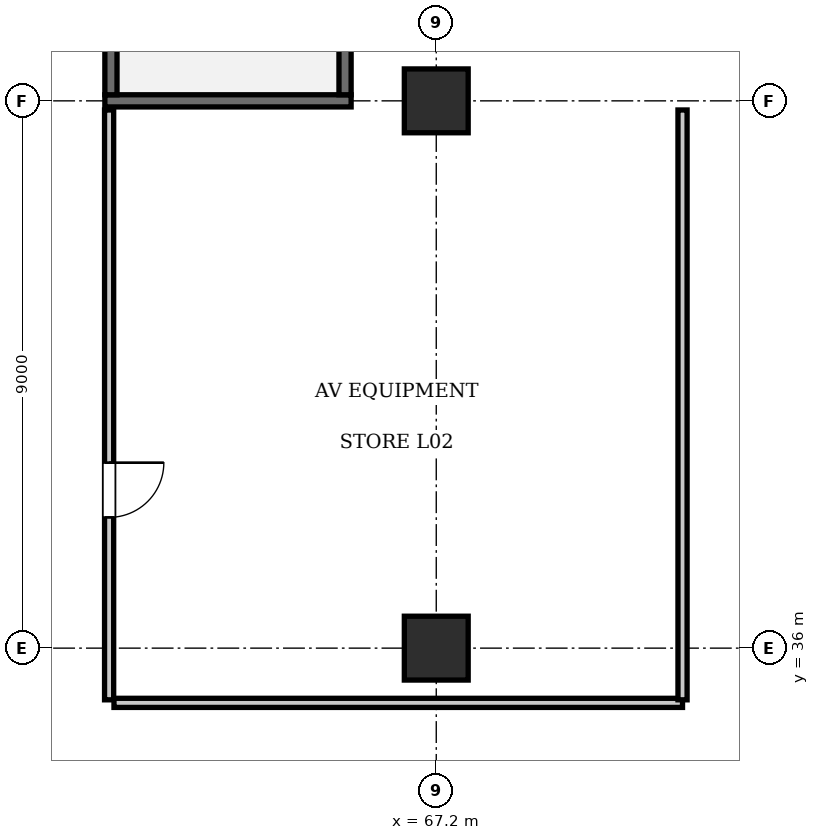
"""IFC4 building model, lengths in metres.
Left out: names, types, materials, properties, quantities, classifications, styles, units other than length and angle.
Written with IfcOpenShell. Run it as: python <this file> out.ifc"""

import sys

from ifc_helpers import new_model, si_unit, direction, frame, frame_2d, origin, origin_2d, place, context, subcontext, project, spatial, rectangle, extrude, element, fill, save


model = new_model("IFC4")
c1 = context("Model", 3, precision=1e-05, world=origin(), true_north=direction((0.0, 1.0)))
c2 = subcontext(c1, "Body", "Model", "MODEL_VIEW")
j1 = project(units=[si_unit("LENGTHUNIT", "METRE"), si_unit("PLANEANGLEUNIT", "RADIAN")], contexts=[c1])
p1 = place(None, origin())
s1 = spatial("IfcSite", under=j1, at=p1, CompositionType="ELEMENT")
p2 = place(p1, origin())
s2 = spatial("IfcBuilding", under=s1, at=p2, CompositionType="ELEMENT")
p3 = place(p2, frame((0.0, 0.0, 10.85)))
s3 = spatial("IfcBuildingStorey", under=s2, at=p3, CompositionType="ELEMENT", Elevation=10.85)
for number, where, z_axis, x_axis in (
    (1, (67.2, 36.0, 0.0), (0.0, 0.0, 1.0), (1.0, 0.0, 0.0)),
    (2, (67.2, 45.0, 0.0), (0.0, 0.0, 1.0), (1.0, 0.0, 0.0)),
):
    element("IfcColumn", number, at=place(p3, frame(where, z_axis=z_axis, x_axis=x_axis)), inside=s3, PredefinedType="COLUMN", context=c2, shape_type="SweptSolid", body=[
        extrude(rectangle(XDim=1.05, YDim=1.05, at=origin_2d()), origin(), (0.0, 0.0, 1.0), 5.6),
    ])
p4 = place(p3, frame((61.75, 45.0, 0.0), z_axis=(0.0, 0.0, 1.0), x_axis=(1.0, 0.0, 0.0)))
e3 = element("IfcWall", 3, at=p4, inside=s3, PredefinedType="SOLIDWALL", context=c2, shape_type="SweptSolid", body=[
    extrude(rectangle(XDim=4.05, YDim=0.2, at=frame_2d((2.025, 0.0))), origin(), (0.0, 0.0, 1.0), 4.685),
])
p5 = place(p3, frame((61.85, 45.1, 0.0), z_axis=(0.0, 0.0, 1.0), x_axis=(0.0, 1.0, 0.0)))
e4 = element("IfcWall", 4, at=p5, inside=s3, PredefinedType="SOLIDWALL", context=c2, shape_type="SweptSolid", body=[
    extrude(rectangle(XDim=8.1, YDim=0.2, at=frame_2d((4.05, 0.0))), origin(), (0.0, 0.0, 1.0), 5.32),
])
p6 = place(p5, frame((6.32, 0.0, 0.0)))
e5 = element("IfcOpeningElement", 5, at=p6, cuts=e4, PredefinedType="OPENING", context=c2, shape_type="SweptSolid", body=[
    extrude(rectangle(XDim=1.15, YDim=2.15, at=frame_2d((0.575, 1.075))), frame((0.0, 0.11, 0.0), z_axis=(0.0, -1.0, 0.0), x_axis=(1.0, 0.0, 0.0)), (0.0, 0.0, 1.0), 0.22),
])
p7 = place(p3, frame((65.7, 45.1, 0.0), z_axis=(0.0, 0.0, 1.0), x_axis=(0.0, 1.0, 0.0)))
e6 = element("IfcWall", 6, at=p7, inside=s3, PredefinedType="SOLIDWALL", context=c2, shape_type="SweptSolid", body=[
    extrude(rectangle(XDim=8.1, YDim=0.2, at=frame_2d((4.05, 0.0))), origin(), (0.0, 0.0, 1.0), 5.32),
])
p8 = place(p3, frame((61.82, 35.15, 0.0), z_axis=(0.0, 0.0, 1.0), x_axis=(0.0, 1.0, 0.0)))
e7 = element("IfcWall", 7, at=p8, inside=s3, PredefinedType="PARTITIONING", context=c2, shape_type="SweptSolid", body=[
    extrude(rectangle(XDim=9.7, YDim=0.15, at=frame_2d((4.85, 0.0))), origin(), (0.0, 0.0, 1.0), 5.32),
])
p9 = place(p8, frame((3.0, 0.0, 0.0)))
e8 = element("IfcOpeningElement", 8, at=p9, cuts=e7, PredefinedType="OPENING", context=c2, shape_type="SweptSolid", body=[
    extrude(rectangle(XDim=0.9, YDim=2.1, at=frame_2d((0.45, 1.05))), frame((0.0, 0.085, 0.0), z_axis=(0.0, -1.0, 0.0), x_axis=(1.0, 0.0, 0.0)), (0.0, 0.0, 1.0), 0.17),
])
p10 = place(p3, frame((61.9, 35.1, 0.0), z_axis=(0.0, 0.0, 1.0), x_axis=(1.0, 0.0, 0.0)))
e9 = element("IfcWall", 9, at=p10, inside=s3, PredefinedType="PARTITIONING", context=c2, shape_type="SweptSolid", body=[
    extrude(rectangle(XDim=9.35, YDim=0.15, at=frame_2d((4.675, 0.0))), origin(), (0.0, 0.0, 1.0), 5.32),
])
p11 = place(p3, frame((71.25, 35.15, 0.0), z_axis=(0.0, 0.0, 1.0), x_axis=(0.0, 1.0, 0.0)))
e10 = element("IfcWall", 10, at=p11, inside=s3, PredefinedType="PARTITIONING", context=c2, shape_type="SweptSolid", body=[
    extrude(rectangle(XDim=9.7, YDim=0.15, at=frame_2d((4.85, 0.0))), origin(), (0.0, 0.0, 1.0), 5.32),
])
p12 = place(p9, frame((0.9, 0.0, 0.0), z_axis=(0.0, 0.0, 1.0), x_axis=(-1.0, 0.0, 0.0)))
e11 = element("IfcDoor", 11, at=p12, inside=s3, OperationType="SINGLE_SWING_LEFT", PredefinedType="DOOR", context=c2, shape_type="SweptSolid", body=[
    extrude(rectangle(XDim=0.9, YDim=2.1, at=frame_2d((0.45, 1.05))), frame((0.0, 0.025, 0.0), z_axis=(0.0, -1.0, 0.0), x_axis=(1.0, 0.0, 0.0)), (0.0, 0.0, 1.0), 0.05),
])
fill(e8, e11)
save(model, sys.argv[1])
